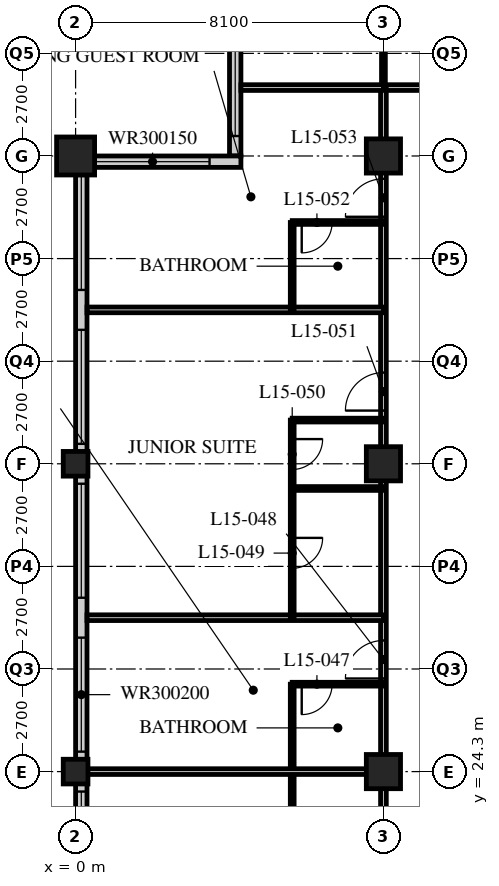
"""IFC4 building model, lengths in metres.
Left out: names, types, materials, properties, quantities, classifications, styles, units other than length and angle.
Written with IfcOpenShell. Run it as: python <this file> out.ifc"""

import sys

from ifc_helpers import new_model, si_unit, direction, frame, frame_2d, origin, origin_2d, place, context, subcontext, project, spatial, rectangle, hollow_rectangle, extrude, element, fill, save


model = new_model("IFC4")
c1 = context("Model", 3, precision=1e-05, world=origin(), true_north=direction((0.0, 1.0)))
c2 = subcontext(c1, "Body", "Model", "MODEL_VIEW")
j1 = project(units=[si_unit("LENGTHUNIT", "METRE"), si_unit("PLANEANGLEUNIT", "RADIAN")], contexts=[c1])
p1 = place(None, origin())
s1 = spatial("IfcSite", under=j1, at=p1, CompositionType="ELEMENT")
p2 = place(p1, origin())
s2 = spatial("IfcBuilding", under=s1, at=p2, CompositionType="ELEMENT")
p3 = place(p2, frame((0.0, 0.0, 63.6)))
s3 = spatial("IfcBuildingStorey", under=s2, at=p3, CompositionType="ELEMENT", Elevation=63.6)
for number, where, z_axis, x_axis in (
    (1, (0.0, 24.3, 0.0), (0.0, 0.0, 1.0), (1.0, 0.0, 0.0)),
    (2, (0.0, 32.4, 0.0), (0.0, 0.0, 1.0), (1.0, 0.0, 0.0)),
):
    element("IfcColumn", number, at=place(p3, frame(where, z_axis=z_axis, x_axis=x_axis)), inside=s3, PredefinedType="COLUMN", context=c2, shape_type="SweptSolid", body=[
        extrude(hollow_rectangle(XDim=0.65, YDim=0.65, WallThickness=0.05, at=origin_2d()), origin(), (0.0, 0.0, 1.0), 3.4),
    ])
p4 = place(p3, frame((0.0, 40.5, 0.0), z_axis=(0.0, 0.0, 1.0), x_axis=(1.0, 0.0, 0.0)))
e3 = element("IfcColumn", 3, at=p4, inside=s3, PredefinedType="COLUMN", context=c2, shape_type="SweptSolid", body=[
    extrude(hollow_rectangle(XDim=1.0, YDim=1.0, WallThickness=0.1, at=origin_2d()), origin(), (0.0, 0.0, 1.0), 3.4),
])
for number, where, z_axis, x_axis in (
    (4, (8.1, 24.3, 0.0), (0.0, 0.0, 1.0), (1.0, 0.0, 0.0)),
    (5, (8.1, 32.4, 0.0), (0.0, 0.0, 1.0), (1.0, 0.0, 0.0)),
    (6, (8.1, 40.5, 0.0), (0.0, 0.0, 1.0), (1.0, 0.0, 0.0)),
):
    element("IfcColumn", number, at=place(p3, frame(where, z_axis=z_axis, x_axis=x_axis)), inside=s3, PredefinedType="COLUMN", context=c2, shape_type="SweptSolid", body=[
        extrude(hollow_rectangle(XDim=0.9, YDim=0.9, WallThickness=0.09, at=origin_2d()), origin(), (0.0, 0.0, 1.0), 3.4),
    ])
p5 = place(p3, frame((4.2, 44.25, 0.0), z_axis=(0.0, 0.0, 1.0), x_axis=(0.0, -1.0, 0.0)))
e7 = element("IfcWall", 7, at=p5, inside=s3, PredefinedType="SOLIDWALL", context=c2, shape_type="SweptSolid", body=[
    extrude(rectangle(XDim=3.75, YDim=0.3, at=frame_2d((1.875, 0.0))), origin(), (0.0, 0.0, 1.0), 3.19),
])
p6 = place(p5, frame((0.225, 0.0, 0.9)))
e8 = element("IfcOpeningElement", 8, at=p6, cuts=e7, PredefinedType="OPENING", context=c2, shape_type="SweptSolid", body=[
    extrude(rectangle(XDim=3.0, YDim=1.5, at=frame_2d((1.5, 0.75))), frame((0.0, 0.16, 0.0), z_axis=(0.0, -1.0, 0.0), x_axis=(1.0, 0.0, 0.0)), (0.0, 0.0, 1.0), 0.32),
])
p7 = place(p3, frame((4.35, 40.35, 0.0), z_axis=(0.0, 0.0, 1.0), x_axis=(-1.0, 0.0, 0.0)))
e9 = element("IfcWall", 9, at=p7, inside=s3, PredefinedType="SOLIDWALL", context=c2, shape_type="SweptSolid", body=[
    extrude(rectangle(XDim=4.35, YDim=0.3, at=frame_2d((2.175, 0.0))), origin(), (0.0, 0.0, 1.0), 3.19),
])
p8 = place(p7, frame((0.825, 0.0, 0.9)))
e10 = element("IfcOpeningElement", 10, at=p8, cuts=e9, PredefinedType="OPENING", context=c2, shape_type="SweptSolid", body=[
    extrude(rectangle(XDim=3.0, YDim=1.5, at=frame_2d((1.5, 0.75))), frame((0.0, 0.16, 0.0), z_axis=(0.0, -1.0, 0.0), x_axis=(1.0, 0.0, 0.0)), (0.0, 0.0, 1.0), 0.32),
])
p9 = place(p3, frame((0.15, 40.2, 0.0), z_axis=(0.0, 0.0, 1.0), x_axis=(0.0, -1.0, 0.0)))
e11 = element("IfcWall", 11, at=p9, inside=s3, PredefinedType="SOLIDWALL", context=c2, shape_type="SweptSolid", body=[
    extrude(rectangle(XDim=32.1, YDim=0.3, at=frame_2d((16.05, 0.0))), origin(), (0.0, 0.0, 1.0), 3.19),
])
p10 = place(p9, frame((0.225, 0.0, 0.9)))
e12 = element("IfcOpeningElement", 12, at=p10, cuts=e11, PredefinedType="OPENING", context=c2, shape_type="SweptSolid", body=[
    extrude(rectangle(XDim=3.0, YDim=2.0, at=frame_2d((1.5, 1.0))), frame((0.0, 0.16, 0.0), z_axis=(0.0, -1.0, 0.0), x_axis=(1.0, 0.0, 0.0)), (0.0, 0.0, 1.0), 0.32),
])
p11 = place(p9, frame((4.275, 0.0, 0.9)))
e13 = element("IfcOpeningElement", 13, at=p11, cuts=e11, PredefinedType="OPENING", context=c2, shape_type="SweptSolid", body=[
    extrude(rectangle(XDim=3.0, YDim=2.0, at=frame_2d((1.5, 1.0))), frame((0.0, 0.16, 0.0), z_axis=(0.0, -1.0, 0.0), x_axis=(1.0, 0.0, 0.0)), (0.0, 0.0, 1.0), 0.32),
])
p12 = place(p9, frame((8.325, 0.0, 0.9)))
e14 = element("IfcOpeningElement", 14, at=p12, cuts=e11, PredefinedType="OPENING", context=c2, shape_type="SweptSolid", body=[
    extrude(rectangle(XDim=3.0, YDim=2.0, at=frame_2d((1.5, 1.0))), frame((0.0, 0.16, 0.0), z_axis=(0.0, -1.0, 0.0), x_axis=(1.0, 0.0, 0.0)), (0.0, 0.0, 1.0), 0.32),
])
p13 = place(p9, frame((12.375, 0.0, 0.9)))
e15 = element("IfcOpeningElement", 15, at=p13, cuts=e11, PredefinedType="OPENING", context=c2, shape_type="SweptSolid", body=[
    extrude(rectangle(XDim=3.0, YDim=2.0, at=frame_2d((1.5, 1.0))), frame((0.0, 0.16, 0.0), z_axis=(0.0, -1.0, 0.0), x_axis=(1.0, 0.0, 0.0)), (0.0, 0.0, 1.0), 0.32),
])
p14 = place(p9, frame((16.425, 0.0, 0.9)))
e16 = element("IfcOpeningElement", 16, at=p14, cuts=e11, PredefinedType="OPENING", context=c2, shape_type="SweptSolid", body=[
    extrude(rectangle(XDim=3.0, YDim=2.0, at=frame_2d((1.5, 1.0))), frame((0.0, 0.16, 0.0), z_axis=(0.0, -1.0, 0.0), x_axis=(1.0, 0.0, 0.0)), (0.0, 0.0, 1.0), 0.32),
])
p15 = place(p9, frame((20.475, 0.0, 0.9)))
e17 = element("IfcOpeningElement", 17, at=p15, cuts=e11, PredefinedType="OPENING", context=c2, shape_type="SweptSolid", body=[
    extrude(rectangle(XDim=3.0, YDim=2.0, at=frame_2d((1.5, 1.0))), frame((0.0, 0.16, 0.0), z_axis=(0.0, -1.0, 0.0), x_axis=(1.0, 0.0, 0.0)), (0.0, 0.0, 1.0), 0.32),
])
p16 = place(p9, frame((24.525, 0.0, 0.9)))
e18 = element("IfcOpeningElement", 18, at=p16, cuts=e11, PredefinedType="OPENING", context=c2, shape_type="SweptSolid", body=[
    extrude(rectangle(XDim=3.0, YDim=2.0, at=frame_2d((1.5, 1.0))), frame((0.0, 0.16, 0.0), z_axis=(0.0, -1.0, 0.0), x_axis=(1.0, 0.0, 0.0)), (0.0, 0.0, 1.0), 0.32),
])
p17 = place(p9, frame((28.575, 0.0, 0.9)))
e19 = element("IfcOpeningElement", 19, at=p17, cuts=e11, PredefinedType="OPENING", context=c2, shape_type="SweptSolid", body=[
    extrude(rectangle(XDim=3.0, YDim=2.0, at=frame_2d((1.5, 1.0))), frame((0.0, 0.16, 0.0), z_axis=(0.0, -1.0, 0.0), x_axis=(1.0, 0.0, 0.0)), (0.0, 0.0, 1.0), 0.32),
])
p18 = place(p3, frame((8.1, 42.3, 0.0), z_axis=(0.0, 0.0, 1.0), x_axis=(1.0, 0.0, 0.0)))
e20 = element("IfcWall", 20, at=p18, inside=s3, PredefinedType="PARTITIONING", context=c2, shape_type="SweptSolid", body=[
    extrude(rectangle(XDim=36.45, YDim=0.15, at=frame_2d((18.225, 0.0))), origin(), (0.0, 0.0, 1.0), 3.19),
])
p19 = place(p18, frame((9.5, 0.0, 0.0)))
e21 = element("IfcOpeningElement", 21, at=p19, cuts=e20, PredefinedType="OPENING", context=c2, shape_type="SweptSolid", body=[
    extrude(rectangle(XDim=1.0, YDim=2.1, at=frame_2d((0.5, 1.05))), frame((0.0, 0.085, 0.0), z_axis=(0.0, -1.0, 0.0), x_axis=(1.0, 0.0, 0.0)), (0.0, 0.0, 1.0), 0.17),
])
p20 = place(p18, frame((14.6, 0.0, 0.0)))
e22 = element("IfcOpeningElement", 22, at=p20, cuts=e20, PredefinedType="OPENING", context=c2, shape_type="SweptSolid", body=[
    extrude(rectangle(XDim=1.0, YDim=2.1, at=frame_2d((0.5, 1.05))), frame((0.0, 0.085, 0.0), z_axis=(0.0, -1.0, 0.0), x_axis=(1.0, 0.0, 0.0)), (0.0, 0.0, 1.0), 0.17),
])
p21 = place(p18, frame((18.65, 0.0, 0.0)))
e23 = element("IfcOpeningElement", 23, at=p21, cuts=e20, PredefinedType="OPENING", context=c2, shape_type="SweptSolid", body=[
    extrude(rectangle(XDim=1.0, YDim=2.1, at=frame_2d((0.5, 1.05))), frame((0.0, 0.085, 0.0), z_axis=(0.0, -1.0, 0.0), x_axis=(1.0, 0.0, 0.0)), (0.0, 0.0, 1.0), 0.17),
])
p22 = place(p18, frame((25.7, 0.0, 0.0)))
e24 = element("IfcOpeningElement", 24, at=p22, cuts=e20, PredefinedType="OPENING", context=c2, shape_type="SweptSolid", body=[
    extrude(rectangle(XDim=1.0, YDim=2.1, at=frame_2d((0.5, 1.05))), frame((0.0, 0.085, 0.0), z_axis=(0.0, -1.0, 0.0), x_axis=(1.0, 0.0, 0.0)), (0.0, 0.0, 1.0), 0.17),
])
p23 = place(p18, frame((30.8, 0.0, 0.0)))
e25 = element("IfcOpeningElement", 25, at=p23, cuts=e20, PredefinedType="OPENING", context=c2, shape_type="SweptSolid", body=[
    extrude(rectangle(XDim=1.0, YDim=2.1, at=frame_2d((0.5, 1.05))), frame((0.0, 0.085, 0.0), z_axis=(0.0, -1.0, 0.0), x_axis=(1.0, 0.0, 0.0)), (0.0, 0.0, 1.0), 0.17),
])
p24 = place(p18, frame((32.825, 0.0, 0.0)))
e26 = element("IfcOpeningElement", 26, at=p24, cuts=e20, PredefinedType="OPENING", context=c2, shape_type="SweptSolid", body=[
    extrude(rectangle(XDim=1.0, YDim=2.1, at=frame_2d((0.5, 1.05))), frame((0.0, 0.085, 0.0), z_axis=(0.0, -1.0, 0.0), x_axis=(1.0, 0.0, 0.0)), (0.0, 0.0, 1.0), 0.17),
])
p25 = place(p18, frame((2.625, 0.0, 0.0)))
e27 = element("IfcOpeningElement", 27, at=p25, cuts=e20, PredefinedType="OPENING", context=c2, shape_type="SweptSolid", body=[
    extrude(rectangle(XDim=1.0, YDim=2.1, at=frame_2d((0.5, 1.05))), frame((0.0, 0.085, 0.0), z_axis=(0.0, -1.0, 0.0), x_axis=(1.0, 0.0, 0.0)), (0.0, 0.0, 1.0), 0.17),
])
p26 = place(p3, frame((8.1, 12.15, 0.0), z_axis=(0.0, 0.0, 1.0), x_axis=(0.0, 1.0, 0.0)))
e28 = element("IfcWall", 28, at=p26, inside=s3, PredefinedType="PARTITIONING", context=c2, shape_type="SweptSolid", body=[
    extrude(rectangle(XDim=30.15, YDim=0.15, at=frame_2d((15.075, 0.0))), origin(), (0.0, 0.0, 1.0), 2.578),
])
p27 = place(p26, frame((0.6, 0.0, 0.0)))
e29 = element("IfcOpeningElement", 29, at=p27, cuts=e28, PredefinedType="OPENING", context=c2, shape_type="SweptSolid", body=[
    extrude(rectangle(XDim=1.0, YDim=2.1, at=frame_2d((0.5, 1.05))), frame((0.0, 0.085, 0.0), z_axis=(0.0, -1.0, 0.0), x_axis=(1.0, 0.0, 0.0)), (0.0, 0.0, 1.0), 0.17),
])
p28 = place(p26, frame((6.8, 0.0, 0.0)))
e30 = element("IfcOpeningElement", 30, at=p28, cuts=e28, PredefinedType="OPENING", context=c2, shape_type="SweptSolid", body=[
    extrude(rectangle(XDim=1.0, YDim=2.1, at=frame_2d((0.5, 1.05))), frame((0.0, 0.085, 0.0), z_axis=(0.0, -1.0, 0.0), x_axis=(1.0, 0.0, 0.0)), (0.0, 0.0, 1.0), 0.17),
])
p29 = place(p26, frame((8.7, 0.0, 0.0)))
e31 = element("IfcOpeningElement", 31, at=p29, cuts=e28, PredefinedType="OPENING", context=c2, shape_type="SweptSolid", body=[
    extrude(rectangle(XDim=1.0, YDim=2.1, at=frame_2d((0.5, 1.05))), frame((0.0, 0.085, 0.0), z_axis=(0.0, -1.0, 0.0), x_axis=(1.0, 0.0, 0.0)), (0.0, 0.0, 1.0), 0.17),
])
p30 = place(p26, frame((14.6, 0.0, 0.0)))
e32 = element("IfcOpeningElement", 32, at=p30, cuts=e28, PredefinedType="OPENING", context=c2, shape_type="SweptSolid", body=[
    extrude(rectangle(XDim=1.0, YDim=2.1, at=frame_2d((0.5, 1.05))), frame((0.0, 0.085, 0.0), z_axis=(0.0, -1.0, 0.0), x_axis=(1.0, 0.0, 0.0)), (0.0, 0.0, 1.0), 0.17),
])
p31 = place(p26, frame((21.65, 0.0, 0.0)))
e33 = element("IfcOpeningElement", 33, at=p31, cuts=e28, PredefinedType="OPENING", context=c2, shape_type="SweptSolid", body=[
    extrude(rectangle(XDim=1.0, YDim=2.1, at=frame_2d((0.5, 1.05))), frame((0.0, 0.085, 0.0), z_axis=(0.0, -1.0, 0.0), x_axis=(1.0, 0.0, 0.0)), (0.0, 0.0, 1.0), 0.17),
])
p32 = place(p26, frame((26.75, 0.0, 0.0)))
e34 = element("IfcOpeningElement", 34, at=p32, cuts=e28, PredefinedType="OPENING", context=c2, shape_type="SweptSolid", body=[
    extrude(rectangle(XDim=1.0, YDim=2.1, at=frame_2d((0.5, 1.05))), frame((0.0, 0.085, 0.0), z_axis=(0.0, -1.0, 0.0), x_axis=(1.0, 0.0, 0.0)), (0.0, 0.0, 1.0), 0.17),
])
p33 = place(p3, frame((5.7, 22.0, 0.0), z_axis=(0.0, 0.0, 1.0), x_axis=(0.0, 1.0, 0.0)))
e35 = element("IfcWall", 35, at=p33, inside=s3, PredefinedType="PARTITIONING", context=c2, shape_type="SweptSolid", body=[
    extrude(rectangle(XDim=4.6, YDim=0.1, at=frame_2d((2.3, 0.0))), origin(), (0.0, 0.0, 1.0), 3.19),
])
p34 = place(p3, frame((8.1, 24.3, 0.0), z_axis=(0.0, 0.0, 1.0), x_axis=(-1.0, 0.0, 0.0)))
e36 = element("IfcWall", 36, at=p34, inside=s3, PredefinedType="PARTITIONING", context=c2, shape_type="SweptSolid", body=[
    extrude(rectangle(XDim=7.8, YDim=0.15, at=frame_2d((3.9, 0.0))), origin(), (0.0, 0.0, 1.0), 2.578),
])
p35 = place(p3, frame((8.1, 26.6, 0.0), z_axis=(0.0, 0.0, 1.0), x_axis=(-1.0, 0.0, 0.0)))
e37 = element("IfcWall", 37, at=p35, inside=s3, PredefinedType="PARTITIONING", context=c2, shape_type="SweptSolid", body=[
    extrude(rectangle(XDim=2.4, YDim=0.1, at=frame_2d((1.2, 0.0))), origin(), (0.0, 0.0, 1.0), 3.19),
])
p36 = place(p35, frame((1.35, 0.0, 0.0)))
e38 = element("IfcOpeningElement", 38, at=p36, cuts=e37, PredefinedType="OPENING", context=c2, shape_type="SweptSolid", body=[
    extrude(rectangle(XDim=0.8, YDim=2.1, at=frame_2d((0.4, 1.05))), frame((0.0, 0.06, 0.0), z_axis=(0.0, -1.0, 0.0), x_axis=(1.0, 0.0, 0.0)), (0.0, 0.0, 1.0), 0.12),
])
p37 = place(p3, frame((8.1, 28.35, 0.0), z_axis=(0.0, 0.0, 1.0), x_axis=(-1.0, 0.0, 0.0)))
e39 = element("IfcWall", 39, at=p37, inside=s3, PredefinedType="PARTITIONING", context=c2, shape_type="SweptSolid", body=[
    extrude(rectangle(XDim=7.8, YDim=0.15, at=frame_2d((3.9, 0.0))), origin(), (0.0, 0.0, 1.0), 3.19),
])
p38 = place(p3, frame((5.7, 28.35, 0.0), z_axis=(0.0, 0.0, 1.0), x_axis=(0.0, 1.0, 0.0)))
e40 = element("IfcWall", 40, at=p38, inside=s3, PredefinedType="PARTITIONING", context=c2, shape_type="SweptSolid", body=[
    extrude(rectangle(XDim=5.2, YDim=0.1, at=frame_2d((2.6, 0.0))), origin(), (0.0, 0.0, 1.0), 3.19),
])
p39 = place(p38, frame((1.3, 0.0, 0.0)))
e41 = element("IfcOpeningElement", 41, at=p39, cuts=e40, PredefinedType="OPENING", context=c2, shape_type="SweptSolid", body=[
    extrude(rectangle(XDim=0.8, YDim=2.1, at=frame_2d((0.4, 1.05))), frame((0.0, 0.06, 0.0), z_axis=(0.0, -1.0, 0.0), x_axis=(1.0, 0.0, 0.0)), (0.0, 0.0, 1.0), 0.12),
])
p40 = place(p38, frame((3.9, 0.0, 0.0)))
e42 = element("IfcOpeningElement", 42, at=p40, cuts=e40, PredefinedType="OPENING", context=c2, shape_type="SweptSolid", body=[
    extrude(rectangle(XDim=0.8, YDim=2.1, at=frame_2d((0.4, 1.05))), frame((0.0, 0.06, 0.0), z_axis=(0.0, -1.0, 0.0), x_axis=(1.0, 0.0, 0.0)), (0.0, 0.0, 1.0), 0.12),
])
for number, where, z_axis, x_axis in (
    (43, (8.1, 31.75, 0.0), (0.0, 0.0, 1.0), (-1.0, 0.0, 0.0)),
    (44, (8.1, 33.55, 0.0), (0.0, 0.0, 1.0), (-1.0, 0.0, 0.0)),
):
    element("IfcWall", number, at=place(p3, frame(where, z_axis=z_axis, x_axis=x_axis)), inside=s3, PredefinedType="PARTITIONING", context=c2, shape_type="SweptSolid", body=[
        extrude(rectangle(XDim=2.4, YDim=0.1, at=frame_2d((1.2, 0.0))), origin(), (0.0, 0.0, 1.0), 3.19),
    ])
p41 = place(p3, frame((8.1, 36.45, 0.0), z_axis=(0.0, 0.0, 1.0), x_axis=(-1.0, 0.0, 0.0)))
e45 = element("IfcWall", 45, at=p41, inside=s3, PredefinedType="PARTITIONING", context=c2, shape_type="SweptSolid", body=[
    extrude(rectangle(XDim=7.8, YDim=0.15, at=frame_2d((3.9, 0.0))), origin(), (0.0, 0.0, 1.0), 3.19),
])
p42 = place(p3, frame((5.7, 36.45, 0.0), z_axis=(0.0, 0.0, 1.0), x_axis=(0.0, 1.0, 0.0)))
e46 = element("IfcWall", 46, at=p42, inside=s3, PredefinedType="PARTITIONING", context=c2, shape_type="SweptSolid", body=[
    extrude(rectangle(XDim=2.3, YDim=0.1, at=frame_2d((1.15, 0.0))), origin(), (0.0, 0.0, 1.0), 3.19),
])
p43 = place(p3, frame((8.1, 38.75, 0.0), z_axis=(0.0, 0.0, 1.0), x_axis=(-1.0, 0.0, 0.0)))
e47 = element("IfcWall", 47, at=p43, inside=s3, PredefinedType="PARTITIONING", context=c2, shape_type="SweptSolid", body=[
    extrude(rectangle(XDim=2.4, YDim=0.1, at=frame_2d((1.2, 0.0))), origin(), (0.0, 0.0, 1.0), 3.19),
])
p44 = place(p43, frame((1.35, 0.0, 0.0)))
e48 = element("IfcOpeningElement", 48, at=p44, cuts=e47, PredefinedType="OPENING", context=c2, shape_type="SweptSolid", body=[
    extrude(rectangle(XDim=0.8, YDim=2.1, at=frame_2d((0.4, 1.05))), frame((0.0, 0.06, 0.0), z_axis=(0.0, -1.0, 0.0), x_axis=(1.0, 0.0, 0.0)), (0.0, 0.0, 1.0), 0.12),
])
p45 = place(p3, frame((8.1, 42.3, 0.0), z_axis=(0.0, 0.0, 1.0), x_axis=(0.0, 1.0, 0.0)))
e49 = element("IfcWall", 49, at=p45, inside=s3, PredefinedType="PARTITIONING", context=c2, shape_type="SweptSolid", body=[
    extrude(rectangle(XDim=2.25, YDim=0.1, at=frame_2d((1.125, 0.0))), origin(), (0.0, 0.0, 1.0), 2.578),
])
p46 = place(p3, frame((4.35, 42.3, 0.0), z_axis=(0.0, 0.0, 1.0), x_axis=(1.0, 0.0, 0.0)))
e50 = element("IfcWall", 50, at=p46, inside=s3, PredefinedType="PARTITIONING", context=c2, shape_type="SweptSolid", body=[
    extrude(rectangle(XDim=3.75, YDim=0.15, at=frame_2d((1.875, 0.0))), origin(), (0.0, 0.0, 1.0), 3.19),
])
p47 = place(p6, origin())
e51 = element("IfcWindow", 51, at=p47, inside=s3, PartitioningType="SINGLE_PANEL", PredefinedType="WINDOW", context=c2, shape_type="SweptSolid", body=[
    extrude(rectangle(XDim=3.0, YDim=1.5, at=frame_2d((1.5, 0.75))), frame((0.0, 0.03, 0.0), z_axis=(0.0, -1.0, 0.0), x_axis=(1.0, 0.0, 0.0)), (0.0, 0.0, 1.0), 0.06),
])
fill(e8, e51)
p48 = place(p8, origin())
e52 = element("IfcWindow", 52, at=p48, inside=s3, PartitioningType="SINGLE_PANEL", PredefinedType="WINDOW", context=c2, shape_type="SweptSolid", body=[
    extrude(rectangle(XDim=3.0, YDim=1.5, at=frame_2d((1.5, 0.75))), frame((0.0, 0.03, 0.0), z_axis=(0.0, -1.0, 0.0), x_axis=(1.0, 0.0, 0.0)), (0.0, 0.0, 1.0), 0.06),
])
fill(e10, e52)
p49 = place(p10, origin())
e53 = element("IfcWindow", 53, at=p49, inside=s3, PartitioningType="SINGLE_PANEL", PredefinedType="WINDOW", context=c2, shape_type="SweptSolid", body=[
    extrude(rectangle(XDim=3.0, YDim=2.0, at=frame_2d((1.5, 1.0))), frame((0.0, 0.03, 0.0), z_axis=(0.0, -1.0, 0.0), x_axis=(1.0, 0.0, 0.0)), (0.0, 0.0, 1.0), 0.06),
])
fill(e12, e53)
p50 = place(p11, origin())
e54 = element("IfcWindow", 54, at=p50, inside=s3, PartitioningType="SINGLE_PANEL", PredefinedType="WINDOW", context=c2, shape_type="SweptSolid", body=[
    extrude(rectangle(XDim=3.0, YDim=2.0, at=frame_2d((1.5, 1.0))), frame((0.0, 0.03, 0.0), z_axis=(0.0, -1.0, 0.0), x_axis=(1.0, 0.0, 0.0)), (0.0, 0.0, 1.0), 0.06),
])
fill(e13, e54)
p51 = place(p12, origin())
e55 = element("IfcWindow", 55, at=p51, inside=s3, PartitioningType="SINGLE_PANEL", PredefinedType="WINDOW", context=c2, shape_type="SweptSolid", body=[
    extrude(rectangle(XDim=3.0, YDim=2.0, at=frame_2d((1.5, 1.0))), frame((0.0, 0.03, 0.0), z_axis=(0.0, -1.0, 0.0), x_axis=(1.0, 0.0, 0.0)), (0.0, 0.0, 1.0), 0.06),
])
fill(e14, e55)
p52 = place(p13, origin())
e56 = element("IfcWindow", 56, at=p52, inside=s3, PartitioningType="SINGLE_PANEL", PredefinedType="WINDOW", context=c2, shape_type="SweptSolid", body=[
    extrude(rectangle(XDim=3.0, YDim=2.0, at=frame_2d((1.5, 1.0))), frame((0.0, 0.03, 0.0), z_axis=(0.0, -1.0, 0.0), x_axis=(1.0, 0.0, 0.0)), (0.0, 0.0, 1.0), 0.06),
])
fill(e15, e56)
p53 = place(p14, origin())
e57 = element("IfcWindow", 57, at=p53, inside=s3, PartitioningType="SINGLE_PANEL", PredefinedType="WINDOW", context=c2, shape_type="SweptSolid", body=[
    extrude(rectangle(XDim=3.0, YDim=2.0, at=frame_2d((1.5, 1.0))), frame((0.0, 0.03, 0.0), z_axis=(0.0, -1.0, 0.0), x_axis=(1.0, 0.0, 0.0)), (0.0, 0.0, 1.0), 0.06),
])
fill(e16, e57)
p54 = place(p36, origin())
e58 = element("IfcDoor", 58, at=p54, inside=s3, OperationType="SINGLE_SWING_RIGHT", PredefinedType="DOOR", context=c2, shape_type="SweptSolid", body=[
    extrude(rectangle(XDim=0.8, YDim=2.1, at=frame_2d((0.4, 1.05))), frame((0.0, 0.025, 0.0), z_axis=(0.0, -1.0, 0.0), x_axis=(1.0, 0.0, 0.0)), (0.0, 0.0, 1.0), 0.05),
])
fill(e38, e58)
p55 = place(p30, origin())
e59 = element("IfcDoor", 59, at=p55, inside=s3, OperationType="SINGLE_SWING_LEFT", PredefinedType="DOOR", context=c2, shape_type="SweptSolid", body=[
    extrude(rectangle(XDim=1.0, YDim=2.1, at=frame_2d((0.5, 1.05))), frame((0.0, 0.025, 0.0), z_axis=(0.0, -1.0, 0.0), x_axis=(1.0, 0.0, 0.0)), (0.0, 0.0, 1.0), 0.05),
])
fill(e32, e59)
p56 = place(p39, origin())
e60 = element("IfcDoor", 60, at=p56, inside=s3, OperationType="SINGLE_SWING_LEFT", PredefinedType="DOOR", context=c2, shape_type="SweptSolid", body=[
    extrude(rectangle(XDim=0.8, YDim=2.1, at=frame_2d((0.4, 1.05))), frame((0.0, 0.025, 0.0), z_axis=(0.0, -1.0, 0.0), x_axis=(1.0, 0.0, 0.0)), (0.0, 0.0, 1.0), 0.05),
])
fill(e41, e60)
p57 = place(p40, origin())
e61 = element("IfcDoor", 61, at=p57, inside=s3, OperationType="SINGLE_SWING_LEFT", PredefinedType="DOOR", context=c2, shape_type="SweptSolid", body=[
    extrude(rectangle(XDim=0.8, YDim=2.1, at=frame_2d((0.4, 1.05))), frame((0.0, 0.025, 0.0), z_axis=(0.0, -1.0, 0.0), x_axis=(1.0, 0.0, 0.0)), (0.0, 0.0, 1.0), 0.05),
])
fill(e42, e61)
p58 = place(p31, origin())
e62 = element("IfcDoor", 62, at=p58, inside=s3, OperationType="SINGLE_SWING_LEFT", PredefinedType="DOOR", context=c2, shape_type="SweptSolid", body=[
    extrude(rectangle(XDim=1.0, YDim=2.1, at=frame_2d((0.5, 1.05))), frame((0.0, 0.025, 0.0), z_axis=(0.0, -1.0, 0.0), x_axis=(1.0, 0.0, 0.0)), (0.0, 0.0, 1.0), 0.05),
])
fill(e33, e62)
p59 = place(p44, origin())
e63 = element("IfcDoor", 63, at=p59, inside=s3, OperationType="SINGLE_SWING_RIGHT", PredefinedType="DOOR", context=c2, shape_type="SweptSolid", body=[
    extrude(rectangle(XDim=0.8, YDim=2.1, at=frame_2d((0.4, 1.05))), frame((0.0, 0.025, 0.0), z_axis=(0.0, -1.0, 0.0), x_axis=(1.0, 0.0, 0.0)), (0.0, 0.0, 1.0), 0.05),
])
fill(e48, e63)
p60 = place(p32, origin())
e64 = element("IfcDoor", 64, at=p60, inside=s3, OperationType="SINGLE_SWING_LEFT", PredefinedType="DOOR", context=c2, shape_type="SweptSolid", body=[
    extrude(rectangle(XDim=1.0, YDim=2.1, at=frame_2d((0.5, 1.05))), frame((0.0, 0.025, 0.0), z_axis=(0.0, -1.0, 0.0), x_axis=(1.0, 0.0, 0.0)), (0.0, 0.0, 1.0), 0.05),
])
fill(e34, e64)
save(model, sys.argv[1])
